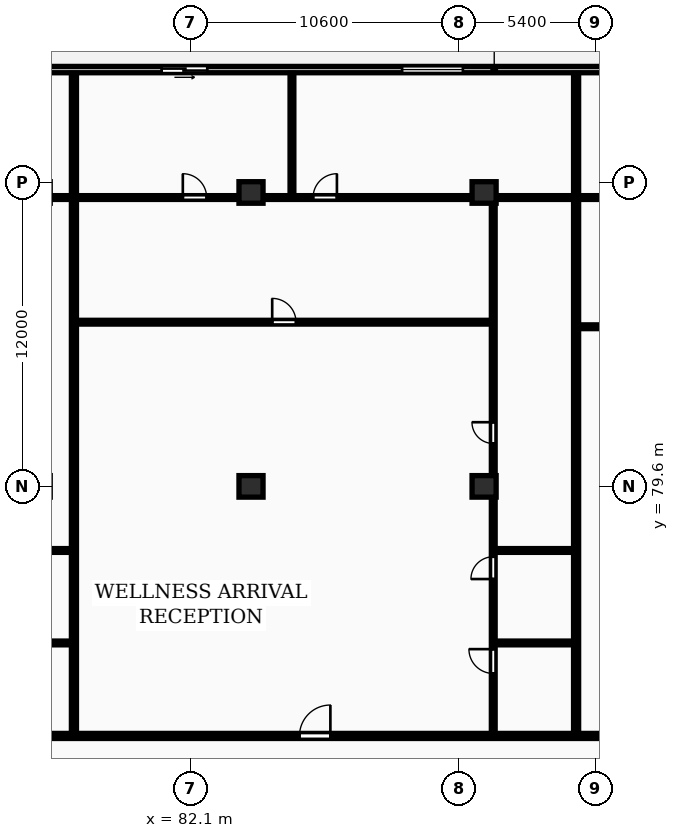
"""IFC4 building model, lengths in metres.
Left out: names, types, materials, properties, quantities, classifications, styles, units other than length and angle.
Written with IfcOpenShell. Run it as: python <this file> out.ifc"""

import sys

from ifc_helpers import new_model, si_unit, direction, frame, frame_2d, origin, origin_2d, place, context, subcontext, project, spatial, rectangle, extrude, element, fill, save


model = new_model("IFC4")
c1 = context("Model", 3, precision=1e-05, world=origin(), true_north=direction((0.0, 1.0)))
c2 = subcontext(c1, "Body", "Model", "MODEL_VIEW")
j1 = project(units=[si_unit("LENGTHUNIT", "METRE"), si_unit("PLANEANGLEUNIT", "RADIAN")], contexts=[c1])
p1 = place(None, origin())
s1 = spatial("IfcSite", under=j1, at=p1, CompositionType="ELEMENT")
p2 = place(p1, origin())
s2 = spatial("IfcBuilding", under=s1, at=p2, CompositionType="ELEMENT")
p3 = place(p2, frame((0.0, 0.0, 119.8)))
s3 = spatial("IfcBuildingStorey", under=s2, at=p3, CompositionType="ELEMENT", Elevation=119.8)
for number, where, z_axis, x_axis in (
    (1, (84.5, 79.6, 0.0), (0.0, 0.0, 1.0), (1.0, 0.0, 0.0)),
    (2, (84.5, 91.2, 0.0), (0.0, 0.0, 1.0), (1.0, 0.0, 0.0)),
    (3, (93.7, 79.6, 0.0), (0.0, 0.0, 1.0), (1.0, 0.0, 0.0)),
    (4, (93.7, 91.2, 0.0), (0.0, 0.0, 1.0), (1.0, 0.0, 0.0)),
):
    element("IfcColumn", number, at=place(p3, frame(where, z_axis=z_axis, x_axis=x_axis)), inside=s3, PredefinedType="COLUMN", context=c2, shape_type="SweptSolid", body=[
        extrude(rectangle(XDim=0.95, YDim=0.85, at=origin_2d()), origin(), (0.0, 0.0, 1.0), 3.25),
    ])
p4 = place(p3, frame((130.6, 96.05, 0.0), z_axis=(0.0, 0.0, 1.0), x_axis=(-1.0, 0.0, 0.0)))
e5 = element("IfcWall", 5, at=p4, inside=s3, PredefinedType="STANDARD", context=c2, shape_type="SweptSolid", body=[
    extrude(rectangle(XDim=73.0, YDim=0.25, at=frame_2d((36.5, 0.0))), origin(), (0.0, 0.0, 1.0), 2.97),
])
p5 = place(p4, frame((67.772, 0.0, 0.0)))
e6 = element("IfcOpeningElement", 6, at=p5, cuts=e5, PredefinedType="OPENING", context=c2, shape_type="SweptSolid", body=[
    extrude(rectangle(XDim=1.8, YDim=2.2, at=frame_2d((0.9, 1.1))), frame((0.0, 0.135, 0.0), z_axis=(0.0, -1.0, 0.0), x_axis=(1.0, 0.0, 0.0)), (0.0, 0.0, 1.0), 0.27),
])
p6 = place(p4, frame((57.637, 0.0, 0.85)))
e7 = element("IfcOpeningElement", 7, at=p6, cuts=e5, PredefinedType="OPENING", context=c2, shape_type="SweptSolid", body=[
    extrude(rectangle(XDim=2.4, YDim=1.9, at=frame_2d((1.2, 0.95))), frame((0.0, 0.135, 0.0), z_axis=(0.0, -1.0, 0.0), x_axis=(1.0, 0.0, 0.0)), (0.0, 0.0, 1.0), 0.27),
])
p7 = place(p4, frame((47.827, 0.0, 0.0)))
e8 = element("IfcOpeningElement", 8, at=p7, cuts=e5, PredefinedType="OPENING", context=c2, shape_type="SweptSolid", body=[
    extrude(rectangle(XDim=1.8, YDim=2.2, at=frame_2d((0.9, 1.1))), frame((0.0, 0.135, 0.0), z_axis=(0.0, -1.0, 0.0), x_axis=(1.0, 0.0, 0.0)), (0.0, 0.0, 1.0), 0.27),
])
p8 = place(p4, frame((37.736, 0.0, 0.85)))
e9 = element("IfcOpeningElement", 9, at=p8, cuts=e5, PredefinedType="OPENING", context=c2, shape_type="SweptSolid", body=[
    extrude(rectangle(XDim=2.4, YDim=1.9, at=frame_2d((1.2, 0.95))), frame((0.0, 0.135, 0.0), z_axis=(0.0, -1.0, 0.0), x_axis=(1.0, 0.0, 0.0)), (0.0, 0.0, 1.0), 0.27),
])
p9 = place(p4, frame((21.9, 0.0, 0.85)))
e10 = element("IfcOpeningElement", 10, at=p9, cuts=e5, PredefinedType="OPENING", context=c2, shape_type="SweptSolid", body=[
    extrude(rectangle(XDim=2.4, YDim=1.9, at=frame_2d((1.2, 0.95))), frame((0.0, 0.135, 0.0), z_axis=(0.0, -1.0, 0.0), x_axis=(1.0, 0.0, 0.0)), (0.0, 0.0, 1.0), 0.27),
])
p10 = place(p4, frame((28.584, 0.0, 0.0)))
e11 = element("IfcOpeningElement", 11, at=p10, cuts=e5, PredefinedType="OPENING", context=c2, shape_type="SweptSolid", body=[
    extrude(rectangle(XDim=1.8, YDim=2.2, at=frame_2d((0.9, 1.1))), frame((0.0, 0.135, 0.0), z_axis=(0.0, -1.0, 0.0), x_axis=(1.0, 0.0, 0.0)), (0.0, 0.0, 1.0), 0.27),
])
p11 = place(p4, frame((16.689, 0.0, 0.85)))
e12 = element("IfcOpeningElement", 12, at=p11, cuts=e5, PredefinedType="OPENING", context=c2, shape_type="SweptSolid", body=[
    extrude(rectangle(XDim=2.4, YDim=1.9, at=frame_2d((1.2, 0.95))), frame((0.0, 0.135, 0.0), z_axis=(0.0, -1.0, 0.0), x_axis=(1.0, 0.0, 0.0)), (0.0, 0.0, 1.0), 0.27),
])
p12 = place(p4, frame((5.475, 0.0, 0.85)))
e13 = element("IfcOpeningElement", 13, at=p12, cuts=e5, PredefinedType="OPENING", context=c2, shape_type="SweptSolid", body=[
    extrude(rectangle(XDim=1.8, YDim=1.8, at=frame_2d((0.9, 0.9))), frame((0.0, 0.135, 0.0), z_axis=(0.0, -1.0, 0.0), x_axis=(1.0, 0.0, 0.0)), (0.0, 0.0, 1.0), 0.27),
])
p13 = place(p4, frame((10.889, 0.0, 0.0)))
e14 = element("IfcOpeningElement", 14, at=p13, cuts=e5, PredefinedType="OPENING", context=c2, shape_type="SweptSolid", body=[
    extrude(rectangle(XDim=1.8, YDim=2.2, at=frame_2d((0.9, 1.1))), frame((0.0, 0.135, 0.0), z_axis=(0.0, -1.0, 0.0), x_axis=(1.0, 0.0, 0.0)), (0.0, 0.0, 1.0), 0.27),
])
p14 = place(p4, frame((1.025, 0.0, 0.85)))
e15 = element("IfcOpeningElement", 15, at=p14, cuts=e5, PredefinedType="OPENING", context=c2, shape_type="SweptSolid", body=[
    extrude(rectangle(XDim=2.4, YDim=1.9, at=frame_2d((1.2, 0.95))), frame((0.0, 0.135, 0.0), z_axis=(0.0, -1.0, 0.0), x_axis=(1.0, 0.0, 0.0)), (0.0, 0.0, 1.0), 0.27),
])
p15 = place(p3, frame((77.51, 69.83, 0.0), z_axis=(0.0, 0.0, 1.0), x_axis=(0.0, 1.0, 0.0)))
e16 = element("IfcWall", 16, at=p15, inside=s3, PredefinedType="PARTITIONING", context=c2, shape_type="SweptSolid", body=[
    extrude(rectangle(XDim=26.07, YDim=0.2, at=frame_2d((13.035, 0.0))), origin(), (0.0, 0.0, 1.0), 2.97),
])
for number, where, z_axis, x_axis in (
    (17, (74.071, 73.42, 0.0), (0.0, 0.0, 1.0), (1.0, 0.0, 0.0)),
    (18, (74.071, 77.07, 0.0), (0.0, 0.0, 1.0), (1.0, 0.0, 0.0)),
):
    element("IfcWall", number, at=place(p3, frame(where, z_axis=z_axis, x_axis=x_axis)), inside=s3, PredefinedType="PARTITIONING", context=c2, shape_type="SweptSolid", body=[
        extrude(rectangle(XDim=3.36, YDim=0.15, at=frame_2d((1.68, 0.0))), origin(), (0.0, 0.0, 1.0), 2.97),
    ])
p16 = place(p3, frame((57.68, 91.0, 0.0), z_axis=(0.0, 0.0, 1.0), x_axis=(1.0, 0.0, 0.0)))
e19 = element("IfcWall", 19, at=p16, inside=s3, PredefinedType="PARTITIONING", context=c2, shape_type="SweptSolid", body=[
    extrude(rectangle(XDim=19.75, YDim=0.15, at=frame_2d((9.875, 0.0))), origin(), (0.0, 0.0, 1.0), 2.663),
])
p17 = place(p16, frame((7.265, 0.0, 0.0)))
e20 = element("IfcOpeningElement", 20, at=p17, cuts=e19, PredefinedType="OPENING", context=c2, shape_type="SweptSolid", body=[
    extrude(rectangle(XDim=0.94, YDim=2.1, at=frame_2d((0.47, 1.05))), frame((0.0, 0.085, 0.0), z_axis=(0.0, -1.0, 0.0), x_axis=(1.0, 0.0, 0.0)), (0.0, 0.0, 1.0), 0.17),
])
p18 = place(p16, frame((12.052, 0.0, 0.0)))
e21 = element("IfcOpeningElement", 21, at=p18, cuts=e19, PredefinedType="OPENING", context=c2, shape_type="SweptSolid", body=[
    extrude(rectangle(XDim=0.94, YDim=2.1, at=frame_2d((0.47, 1.05))), frame((0.0, 0.085, 0.0), z_axis=(0.0, -1.0, 0.0), x_axis=(1.0, 0.0, 0.0)), (0.0, 0.0, 1.0), 0.17),
])
p19 = place(p3, frame((97.332, 69.83, 0.0), z_axis=(0.0, 0.0, 1.0), x_axis=(0.0, 1.0, 0.0)))
e22 = element("IfcWall", 22, at=p19, inside=s3, PredefinedType="PARTITIONING", context=c2, shape_type="SweptSolid", body=[
    extrude(rectangle(XDim=26.07, YDim=0.2, at=frame_2d((13.035, 0.0))), origin(), (0.0, 0.0, 1.0), 2.97),
])
p20 = place(p3, frame((77.591, 86.08, 0.0), z_axis=(0.0, 0.0, 1.0), x_axis=(1.0, 0.0, 0.0)))
e23 = element("IfcWall", 23, at=p20, inside=s3, PredefinedType="PARTITIONING", context=c2, shape_type="SweptSolid", body=[
    extrude(rectangle(XDim=16.431, YDim=0.15, at=frame_2d((8.215, 0.0))), origin(), (0.0, 0.0, 1.0), 2.97),
])
p21 = place(p20, frame((7.746, 0.0, 0.0)))
e24 = element("IfcOpeningElement", 24, at=p21, cuts=e23, PredefinedType="OPENING", context=c2, shape_type="SweptSolid", body=[
    extrude(rectangle(XDim=0.94, YDim=2.1, at=frame_2d((0.47, 1.05))), frame((0.0, 0.085, 0.0), z_axis=(0.0, -1.0, 0.0), x_axis=(1.0, 0.0, 0.0)), (0.0, 0.0, 1.0), 0.17),
])
for number, where, z_axis, x_axis in (
    (25, (94.122, 73.42, 0.0), (0.0, 0.0, 1.0), (1.0, 0.0, 0.0)),
    (26, (94.122, 77.07, 0.0), (0.0, 0.0, 1.0), (1.0, 0.0, 0.0)),
):
    element("IfcWall", number, at=place(p3, frame(where, z_axis=z_axis, x_axis=x_axis)), inside=s3, PredefinedType="PARTITIONING", context=c2, shape_type="SweptSolid", body=[
        extrude(rectangle(XDim=3.13, YDim=0.15, at=frame_2d((1.565, 0.0))), origin(), (0.0, 0.0, 1.0), 2.97),
    ])
p22 = place(p3, frame((94.062, 69.81, 0.0), z_axis=(0.0, 0.0, 1.0), x_axis=(0.0, 1.0, 0.0)))
e27 = element("IfcWall", 27, at=p22, inside=s3, PredefinedType="PARTITIONING", context=c2, shape_type="SweptSolid", body=[
    extrude(rectangle(XDim=21.13, YDim=0.15, at=frame_2d((10.565, 0.0))), origin(), (0.0, 0.0, 1.0), 2.97),
])
p23 = place(p22, frame((2.406, 0.0, 0.0)))
e28 = element("IfcOpeningElement", 28, at=p23, cuts=e27, PredefinedType="OPENING", context=c2, shape_type="SweptSolid", body=[
    extrude(rectangle(XDim=0.96, YDim=2.1, at=frame_2d((0.48, 1.05))), frame((0.0, 0.085, 0.0), z_axis=(0.0, -1.0, 0.0), x_axis=(1.0, 0.0, 0.0)), (0.0, 0.0, 1.0), 0.17),
])
p24 = place(p22, frame((6.133, 0.0, 0.0)))
e29 = element("IfcOpeningElement", 29, at=p24, cuts=e27, PredefinedType="OPENING", context=c2, shape_type="SweptSolid", body=[
    extrude(rectangle(XDim=0.88, YDim=2.06, at=frame_2d((0.44, 1.03))), frame((0.0, 0.085, 0.0), z_axis=(0.0, -1.0, 0.0), x_axis=(1.0, 0.0, 0.0)), (0.0, 0.0, 1.0), 0.17),
])
p25 = place(p22, frame((11.482, 0.0, 0.0)))
e30 = element("IfcOpeningElement", 30, at=p25, cuts=e27, PredefinedType="OPENING", context=c2, shape_type="SweptSolid", body=[
    extrude(rectangle(XDim=0.84, YDim=2.04, at=frame_2d((0.42, 1.02))), frame((0.0, 0.085, 0.0), z_axis=(0.0, -1.0, 0.0), x_axis=(1.0, 0.0, 0.0)), (0.0, 0.0, 1.0), 0.17),
])
p26 = place(p3, frame((86.116, 91.08, 0.0), z_axis=(0.0, 0.0, 1.0), x_axis=(0.0, 1.0, 0.0)))
e31 = element("IfcWall", 31, at=p26, inside=s3, PredefinedType="PARTITIONING", context=c2, shape_type="SweptSolid", body=[
    extrude(rectangle(XDim=4.82, YDim=0.15, at=frame_2d((2.41, 0.0))), origin(), (0.0, 0.0, 1.0), 2.97),
])
p27 = place(p3, frame((77.591, 91.0, 0.0), z_axis=(0.0, 0.0, 1.0), x_axis=(1.0, 0.0, 0.0)))
e32 = element("IfcWall", 32, at=p27, inside=s3, PredefinedType="PARTITIONING", context=c2, shape_type="SweptSolid", body=[
    extrude(rectangle(XDim=19.661, YDim=0.15, at=frame_2d((9.831, 0.0))), origin(), (0.0, 0.0, 1.0), 2.663),
])
p28 = place(p27, frame((4.218, 0.0, 0.0)))
e33 = element("IfcOpeningElement", 33, at=p28, cuts=e32, PredefinedType="OPENING", context=c2, shape_type="SweptSolid", body=[
    extrude(rectangle(XDim=0.94, YDim=2.1, at=frame_2d((0.47, 1.05))), frame((0.0, 0.085, 0.0), z_axis=(0.0, -1.0, 0.0), x_axis=(1.0, 0.0, 0.0)), (0.0, 0.0, 1.0), 0.17),
])
p29 = place(p27, frame((9.361, 0.0, 0.0)))
e34 = element("IfcOpeningElement", 34, at=p29, cuts=e32, PredefinedType="OPENING", context=c2, shape_type="SweptSolid", body=[
    extrude(rectangle(XDim=0.94, YDim=2.1, at=frame_2d((0.47, 1.05))), frame((0.0, 0.085, 0.0), z_axis=(0.0, -1.0, 0.0), x_axis=(1.0, 0.0, 0.0)), (0.0, 0.0, 1.0), 0.17),
])
p30 = place(p3, frame((97.412, 85.9, 0.0), z_axis=(0.0, 0.0, 1.0), x_axis=(1.0, 0.0, 0.0)))
e35 = element("IfcWall", 35, at=p30, inside=s3, PredefinedType="PARTITIONING", context=c2, shape_type="SweptSolid", body=[
    extrude(rectangle(XDim=17.83, YDim=0.15, at=frame_2d((8.915, 0.0))), origin(), (0.0, 0.0, 1.0), 2.97),
])
p31 = place(p30, frame((2.72, 0.0, 0.0)))
e36 = element("IfcOpeningElement", 36, at=p31, cuts=e35, PredefinedType="OPENING", context=c2, shape_type="SweptSolid", body=[
    extrude(rectangle(XDim=0.92, YDim=2.08, at=frame_2d((0.46, 1.04))), frame((0.0, 0.085, 0.0), z_axis=(0.0, -1.0, 0.0), x_axis=(1.0, 0.0, 0.0)), (0.0, 0.0, 1.0), 0.17),
])
p32 = place(p3, frame((97.412, 91.0, 0.0), z_axis=(0.0, 0.0, 1.0), x_axis=(1.0, 0.0, 0.0)))
e37 = element("IfcWall", 37, at=p32, inside=s3, PredefinedType="PARTITIONING", context=c2, shape_type="SweptSolid", body=[
    extrude(rectangle(XDim=12.808, YDim=0.15, at=frame_2d((6.404, 0.0))), origin(), (0.0, 0.0, 1.0), 2.663),
])
p33 = place(p32, frame((2.858, 0.0, 0.0)))
e38 = element("IfcOpeningElement", 38, at=p33, cuts=e37, PredefinedType="OPENING", context=c2, shape_type="SweptSolid", body=[
    extrude(rectangle(XDim=0.94, YDim=2.1, at=frame_2d((0.47, 1.05))), frame((0.0, 0.085, 0.0), z_axis=(0.0, -1.0, 0.0), x_axis=(1.0, 0.0, 0.0)), (0.0, 0.0, 1.0), 0.17),
])
p34 = place(p32, frame((7.618, 0.0, 0.0)))
e39 = element("IfcOpeningElement", 39, at=p34, cuts=e37, PredefinedType="OPENING", context=c2, shape_type="SweptSolid", body=[
    extrude(rectangle(XDim=0.88, YDim=2.06, at=frame_2d((0.44, 1.03))), frame((0.0, 0.085, 0.0), z_axis=(0.0, -1.0, 0.0), x_axis=(1.0, 0.0, 0.0)), (0.0, 0.0, 1.0), 0.17),
])
p35 = place(p3, frame((57.6, 69.75, 0.0), z_axis=(0.0, 0.0, 1.0), x_axis=(1.0, 0.0, 0.0)))
e40 = element("IfcWall", 40, at=p35, inside=s3, PredefinedType="PARTITIONING", context=c2, shape_type="SweptSolid", body=[
    extrude(rectangle(XDim=73.0, YDim=0.2, at=frame_2d((36.5, 0.0))), origin(), (0.0, 0.0, 1.0), 2.97),
])
p36 = place(p35, frame((7.364, 0.0, 0.0)))
e41 = element("IfcOpeningElement", 41, at=p36, cuts=e40, PredefinedType="OPENING", context=c2, shape_type="SweptSolid", body=[
    extrude(rectangle(XDim=1.22, YDim=2.18, at=frame_2d((0.61, 1.09))), frame((0.0, 0.11, 0.0), z_axis=(0.0, -1.0, 0.0), x_axis=(1.0, 0.0, 0.0)), (0.0, 0.0, 1.0), 0.22),
])
p37 = place(p35, frame((28.813, 0.0, 0.0)))
e42 = element("IfcOpeningElement", 42, at=p37, cuts=e40, PredefinedType="OPENING", context=c2, shape_type="SweptSolid", body=[
    extrude(rectangle(XDim=1.22, YDim=2.18, at=frame_2d((0.61, 1.09))), frame((0.0, 0.11, 0.0), z_axis=(0.0, -1.0, 0.0), x_axis=(1.0, 0.0, 0.0)), (0.0, 0.0, 1.0), 0.22),
])
p38 = place(p35, frame((41.777, 0.0, 0.0)))
e43 = element("IfcOpeningElement", 43, at=p38, cuts=e40, PredefinedType="OPENING", context=c2, shape_type="SweptSolid", body=[
    extrude(rectangle(XDim=0.95, YDim=2.15, at=frame_2d((0.475, 1.075))), frame((0.0, 0.11, 0.0), z_axis=(0.0, -1.0, 0.0), x_axis=(1.0, 0.0, 0.0)), (0.0, 0.0, 1.0), 0.22),
])
p39 = place(p35, frame((59.766, 0.0, 0.0)))
e44 = element("IfcOpeningElement", 44, at=p39, cuts=e40, PredefinedType="OPENING", context=c2, shape_type="SweptSolid", body=[
    extrude(rectangle(XDim=0.95, YDim=2.15, at=frame_2d((0.475, 1.075))), frame((0.0, 0.11, 0.0), z_axis=(0.0, -1.0, 0.0), x_axis=(1.0, 0.0, 0.0)), (0.0, 0.0, 1.0), 0.22),
])
p40 = place(p7, origin())
e45 = element("IfcDoor", 45, at=p40, inside=s3, OperationType="SLIDING_TO_LEFT", PredefinedType="DOOR", context=c2, shape_type="SweptSolid", body=[
    extrude(rectangle(XDim=1.8, YDim=2.2, at=frame_2d((0.9, 1.1))), frame((0.0, 0.025, 0.0), z_axis=(0.0, -1.0, 0.0), x_axis=(1.0, 0.0, 0.0)), (0.0, 0.0, 1.0), 0.05),
])
fill(e8, e45)
p41 = place(p8, origin())
e46 = element("IfcWindow", 46, at=p41, inside=s3, PartitioningType="DOUBLE_PANEL_VERTICAL", PredefinedType="WINDOW", context=c2, shape_type="SweptSolid", body=[
    extrude(rectangle(XDim=2.4, YDim=1.9, at=frame_2d((1.2, 0.95))), frame((0.0, 0.03, 0.0), z_axis=(0.0, -1.0, 0.0), x_axis=(1.0, 0.0, 0.0)), (0.0, 0.0, 1.0), 0.06),
])
fill(e9, e46)
p42 = place(p21, origin())
e47 = element("IfcDoor", 47, at=p42, inside=s3, OperationType="SINGLE_SWING_LEFT", PredefinedType="DOOR", context=c2, shape_type="SweptSolid", body=[
    extrude(rectangle(XDim=0.94, YDim=2.1, at=frame_2d((0.47, 1.05))), frame((0.0, 0.025, 0.0), z_axis=(0.0, -1.0, 0.0), x_axis=(1.0, 0.0, 0.0)), (0.0, 0.0, 1.0), 0.05),
])
fill(e24, e47)
p43 = place(p23, origin())
e48 = element("IfcDoor", 48, at=p43, inside=s3, OperationType="SINGLE_SWING_RIGHT", PredefinedType="DOOR", context=c2, shape_type="SweptSolid", body=[
    extrude(rectangle(XDim=0.96, YDim=2.1, at=frame_2d((0.48, 1.05))), frame((0.0, 0.025, 0.0), z_axis=(0.0, -1.0, 0.0), x_axis=(1.0, 0.0, 0.0)), (0.0, 0.0, 1.0), 0.05),
])
fill(e28, e48)
p44 = place(p24, origin())
e49 = element("IfcDoor", 49, at=p44, inside=s3, OperationType="SINGLE_SWING_LEFT", PredefinedType="DOOR", context=c2, shape_type="SweptSolid", body=[
    extrude(rectangle(XDim=0.88, YDim=2.06, at=frame_2d((0.44, 1.03))), frame((0.0, 0.025, 0.0), z_axis=(0.0, -1.0, 0.0), x_axis=(1.0, 0.0, 0.0)), (0.0, 0.0, 1.0), 0.05),
])
fill(e29, e49)
p45 = place(p25, origin())
e50 = element("IfcDoor", 50, at=p45, inside=s3, OperationType="SINGLE_SWING_RIGHT", PredefinedType="DOOR", context=c2, shape_type="SweptSolid", body=[
    extrude(rectangle(XDim=0.84, YDim=2.04, at=frame_2d((0.42, 1.02))), frame((0.0, 0.025, 0.0), z_axis=(0.0, -1.0, 0.0), x_axis=(1.0, 0.0, 0.0)), (0.0, 0.0, 1.0), 0.05),
])
fill(e30, e50)
p46 = place(p28, origin())
e51 = element("IfcDoor", 51, at=p46, inside=s3, OperationType="SINGLE_SWING_LEFT", PredefinedType="DOOR", context=c2, shape_type="SweptSolid", body=[
    extrude(rectangle(XDim=0.94, YDim=2.1, at=frame_2d((0.47, 1.05))), frame((0.0, 0.025, 0.0), z_axis=(0.0, -1.0, 0.0), x_axis=(1.0, 0.0, 0.0)), (0.0, 0.0, 1.0), 0.05),
])
fill(e33, e51)
p47 = place(p29, origin())
e52 = element("IfcDoor", 52, at=p47, inside=s3, OperationType="SINGLE_SWING_RIGHT", PredefinedType="DOOR", context=c2, shape_type="SweptSolid", body=[
    extrude(rectangle(XDim=0.94, YDim=2.1, at=frame_2d((0.47, 1.05))), frame((0.0, 0.025, 0.0), z_axis=(0.0, -1.0, 0.0), x_axis=(1.0, 0.0, 0.0)), (0.0, 0.0, 1.0), 0.05),
])
fill(e34, e52)
p48 = place(p37, origin())
e53 = element("IfcDoor", 53, at=p48, inside=s3, OperationType="SINGLE_SWING_RIGHT", PredefinedType="DOOR", context=c2, shape_type="SweptSolid", body=[
    extrude(rectangle(XDim=1.22, YDim=2.18, at=frame_2d((0.61, 1.09))), frame((0.0, 0.025, 0.0), z_axis=(0.0, -1.0, 0.0), x_axis=(1.0, 0.0, 0.0)), (0.0, 0.0, 1.0), 0.05),
])
fill(e42, e53)
save(model, sys.argv[1])
